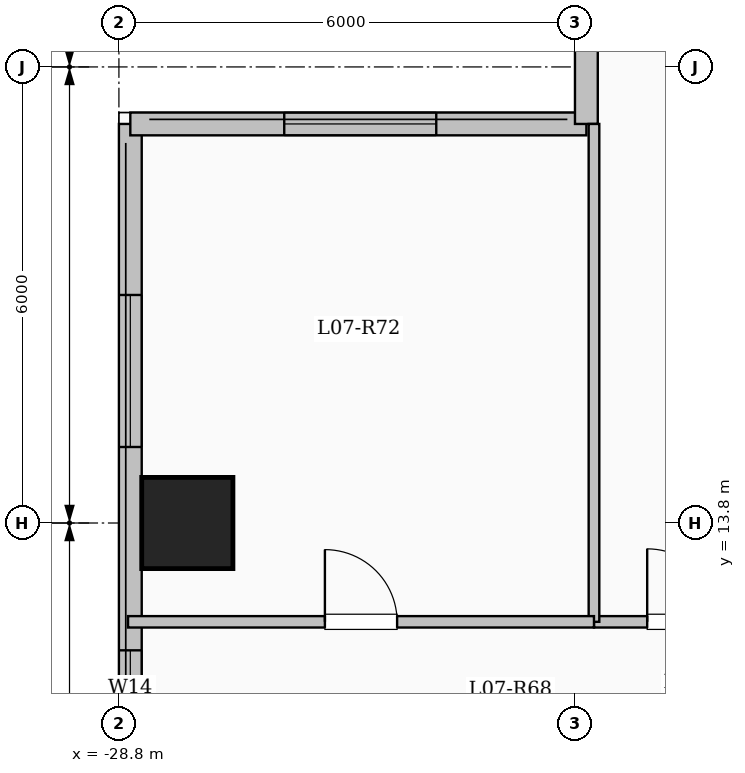
"""IFC4 building model, lengths in metres.
Left out: names, types, materials, properties, quantities, classifications, styles, units other than length and angle.
Written with IfcOpenShell. Run it as: python <this file> out.ifc"""

import sys

from ifc_helpers import new_model, si_unit, direction, frame, frame_2d, origin, origin_2d, place, context, subcontext, project, spatial, rectangle, extrude, element, fill, save


model = new_model("IFC4")
c1 = context("Model", 3, precision=1e-05, world=origin(), true_north=direction((0.0, 1.0)))
c2 = subcontext(c1, "Body", "Model", "MODEL_VIEW")
j1 = project(units=[si_unit("LENGTHUNIT", "METRE"), si_unit("PLANEANGLEUNIT", "RADIAN")], contexts=[c1])
p1 = place(None, origin())
s1 = spatial("IfcSite", under=j1, at=p1, CompositionType="ELEMENT")
p2 = place(p1, origin())
s2 = spatial("IfcBuilding", under=s1, at=p2, CompositionType="ELEMENT")
p3 = place(p2, frame((0.0, 0.0, 30.7)))
s3 = spatial("IfcBuildingStorey", under=s2, at=p3, CompositionType="ELEMENT", Elevation=30.7)
p4 = place(p3, frame((-27.9, 13.8, 0.0), z_axis=(0.0, 0.0, 1.0), x_axis=(1.0, 0.0, 0.0)))
e1 = element("IfcColumn", 1, at=p4, inside=s3, PredefinedType="COLUMN", context=c2, shape_type="SweptSolid", body=[
    extrude(rectangle(XDim=1.2, YDim=1.2, at=origin_2d()), origin(), (0.0, 0.0, 1.0), 3.35),
])
p5 = place(p3, frame((-28.65, -19.05, 0.0), z_axis=(0.0, 0.0, 1.0), x_axis=(0.0, 1.0, 0.0)))
e2 = element("IfcWall", 2, at=p5, inside=s3, PredefinedType="SOLIDWALL", context=c2, shape_type="SweptSolid", body=[
    extrude(rectangle(XDim=38.1, YDim=0.3, at=frame_2d((19.05, 0.0))), origin(), (0.0, 0.0, 1.0), 3.1),
])
p6 = place(p5, frame((3.15, 0.0, 0.9)))
e3 = element("IfcOpeningElement", 3, at=p6, cuts=e2, PredefinedType="OPENING", context=c2, shape_type="SweptSolid", body=[
    extrude(rectangle(XDim=2.4, YDim=1.8, at=frame_2d((1.2, 0.9))), frame((0.0, 0.16, 0.0), z_axis=(0.0, -1.0, 0.0), x_axis=(1.0, 0.0, 0.0)), (0.0, 0.0, 1.0), 0.32),
])
p7 = place(p5, frame((9.542, 0.0, 0.9)))
e4 = element("IfcOpeningElement", 4, at=p7, cuts=e2, PredefinedType="OPENING", context=c2, shape_type="SweptSolid", body=[
    extrude(rectangle(XDim=1.5, YDim=1.65, at=frame_2d((0.75, 0.825))), frame((0.0, 0.16, 0.0), z_axis=(0.0, -1.0, 0.0), x_axis=(1.0, 0.0, 0.0)), (0.0, 0.0, 1.0), 0.32),
])
p8 = place(p5, frame((19.8, 0.0, 0.9)))
e5 = element("IfcOpeningElement", 5, at=p8, cuts=e2, PredefinedType="OPENING", context=c2, shape_type="SweptSolid", body=[
    extrude(rectangle(XDim=2.0, YDim=1.7, at=frame_2d((1.0, 0.85))), frame((0.0, 0.16, 0.0), z_axis=(0.0, -1.0, 0.0), x_axis=(1.0, 0.0, 0.0)), (0.0, 0.0, 1.0), 0.32),
])
p9 = place(p5, frame((30.175, 0.0, 0.95)))
e6 = element("IfcOpeningElement", 6, at=p9, cuts=e2, PredefinedType="OPENING", context=c2, shape_type="SweptSolid", body=[
    extrude(rectangle(XDim=1.0, YDim=1.5, at=frame_2d((0.5, 0.75))), frame((0.0, 0.16, 0.0), z_axis=(0.0, -1.0, 0.0), x_axis=(1.0, 0.0, 0.0)), (0.0, 0.0, 1.0), 0.32),
])
p10 = place(p5, frame((33.85, 0.0, 0.9)))
e7 = element("IfcOpeningElement", 7, at=p10, cuts=e2, PredefinedType="OPENING", context=c2, shape_type="SweptSolid", body=[
    extrude(rectangle(XDim=2.0, YDim=1.7, at=frame_2d((1.0, 0.85))), frame((0.0, 0.16, 0.0), z_axis=(0.0, -1.0, 0.0), x_axis=(1.0, 0.0, 0.0)), (0.0, 0.0, 1.0), 0.32),
])
p11 = place(p3, frame((-28.65, 19.05, 0.0), z_axis=(0.0, 0.0, 1.0), x_axis=(1.0, 0.0, 0.0)))
e8 = element("IfcWall", 8, at=p11, inside=s3, PredefinedType="SOLIDWALL", context=c2, shape_type="SweptSolid", body=[
    extrude(rectangle(XDim=6.0, YDim=0.3, at=frame_2d((3.0, 0.0))), origin(), (0.0, 0.0, 1.0), 3.1),
])
p12 = place(p11, frame((2.025, 0.0, 0.9)))
e9 = element("IfcOpeningElement", 9, at=p12, cuts=e8, PredefinedType="OPENING", context=c2, shape_type="SweptSolid", body=[
    extrude(rectangle(XDim=2.0, YDim=1.7, at=frame_2d((1.0, 0.85))), frame((0.0, 0.16, 0.0), z_axis=(0.0, -1.0, 0.0), x_axis=(1.0, 0.0, 0.0)), (0.0, 0.0, 1.0), 0.32),
])
p13 = place(p3, frame((-22.65, 19.05, 0.0), z_axis=(0.0, 0.0, 1.0), x_axis=(0.0, 1.0, 0.0)))
e10 = element("IfcWall", 10, at=p13, inside=s3, PredefinedType="SOLIDWALL", context=c2, shape_type="SweptSolid", body=[
    extrude(rectangle(XDim=4.5, YDim=0.3, at=frame_2d((2.25, 0.0))), origin(), (0.0, 0.0, 1.0), 3.1),
])
p14 = place(p13, frame((1.032, 0.0, 0.9)))
e11 = element("IfcOpeningElement", 11, at=p14, cuts=e10, PredefinedType="OPENING", context=c2, shape_type="SweptSolid", body=[
    extrude(rectangle(XDim=2.4, YDim=1.8, at=frame_2d((1.2, 0.9))), frame((0.0, 0.16, 0.0), z_axis=(0.0, -1.0, 0.0), x_axis=(1.0, 0.0, 0.0)), (0.0, 0.0, 1.0), 0.32),
])
p15 = place(p3, frame((-22.55, 12.5, 0.0), z_axis=(0.0, 0.0, 1.0), x_axis=(1.0, 0.0, 0.0)))
e12 = element("IfcWall", 12, at=p15, inside=s3, PredefinedType="PARTITIONING", context=c2, shape_type="SweptSolid", body=[
    extrude(rectangle(XDim=18.7, YDim=0.15, at=frame_2d((9.35, 0.0))), origin(), (0.0, 0.0, 1.0), 3.1),
])
p16 = place(p15, frame((0.7, 0.0, 0.0)))
e13 = element("IfcOpeningElement", 13, at=p16, cuts=e12, PredefinedType="OPENING", context=c2, shape_type="SweptSolid", body=[
    extrude(rectangle(XDim=0.96, YDim=2.15, at=frame_2d((0.48, 1.075))), frame((0.0, 0.085, 0.0), z_axis=(0.0, -1.0, 0.0), x_axis=(1.0, 0.0, 0.0)), (0.0, 0.0, 1.0), 0.17),
])
p17 = place(p3, frame((-22.55, 12.5, 0.0), z_axis=(0.0, 0.0, 1.0), x_axis=(0.0, 1.0, 0.0)))
e14 = element("IfcWall", 14, at=p17, inside=s3, PredefinedType="PARTITIONING", context=c2, shape_type="SweptSolid", body=[
    extrude(rectangle(XDim=6.55, YDim=0.14, at=frame_2d((3.275, 0.0))), origin(), (0.0, 0.0, 1.0), 3.1),
])
p18 = place(p3, frame((-28.68, 12.5, 0.0), z_axis=(0.0, 0.0, 1.0), x_axis=(1.0, 0.0, 0.0)))
e15 = element("IfcWall", 15, at=p18, inside=s3, PredefinedType="PARTITIONING", context=c2, shape_type="SweptSolid", body=[
    extrude(rectangle(XDim=6.13, YDim=0.15, at=frame_2d((3.065, 0.0))), origin(), (0.0, 0.0, 1.0), 3.1),
])
p19 = place(p18, frame((2.59, 0.0, 0.0)))
e16 = element("IfcOpeningElement", 16, at=p19, cuts=e15, PredefinedType="OPENING", context=c2, shape_type="SweptSolid", body=[
    extrude(rectangle(XDim=0.95, YDim=2.15, at=frame_2d((0.475, 1.075))), frame((0.0, 0.085, 0.0), z_axis=(0.0, -1.0, 0.0), x_axis=(1.0, 0.0, 0.0)), (0.0, 0.0, 1.0), 0.17),
])
p20 = place(p9, origin())
e17 = element("IfcWindow", 17, at=p20, inside=s3, PartitioningType="SINGLE_PANEL", PredefinedType="WINDOW", context=c2, shape_type="SweptSolid", body=[
    extrude(rectangle(XDim=1.0, YDim=1.5, at=frame_2d((0.5, 0.75))), frame((0.0, 0.03, 0.0), z_axis=(0.0, -1.0, 0.0), x_axis=(1.0, 0.0, 0.0)), (0.0, 0.0, 1.0), 0.06),
])
fill(e6, e17)
p21 = place(p10, origin())
e18 = element("IfcWindow", 18, at=p21, inside=s3, PartitioningType="SINGLE_PANEL", PredefinedType="WINDOW", context=c2, shape_type="SweptSolid", body=[
    extrude(rectangle(XDim=2.0, YDim=1.7, at=frame_2d((1.0, 0.85))), frame((0.0, 0.03, 0.0), z_axis=(0.0, -1.0, 0.0), x_axis=(1.0, 0.0, 0.0)), (0.0, 0.0, 1.0), 0.06),
])
fill(e7, e18)
p22 = place(p12, origin())
e19 = element("IfcWindow", 19, at=p22, inside=s3, PartitioningType="SINGLE_PANEL", PredefinedType="WINDOW", context=c2, shape_type="SweptSolid", body=[
    extrude(rectangle(XDim=2.0, YDim=1.7, at=frame_2d((1.0, 0.85))), frame((0.0, 0.03, 0.0), z_axis=(0.0, -1.0, 0.0), x_axis=(1.0, 0.0, 0.0)), (0.0, 0.0, 1.0), 0.06),
])
fill(e9, e19)
p23 = place(p16, origin())
e20 = element("IfcDoor", 20, at=p23, inside=s3, OperationType="SINGLE_SWING_LEFT", PredefinedType="DOOR", context=c2, shape_type="SweptSolid", body=[
    extrude(rectangle(XDim=0.96, YDim=2.15, at=frame_2d((0.48, 1.075))), frame((0.0, 0.025, 0.0), z_axis=(0.0, -1.0, 0.0), x_axis=(1.0, 0.0, 0.0)), (0.0, 0.0, 1.0), 0.05),
])
fill(e13, e20)
p24 = place(p19, origin())
e21 = element("IfcDoor", 21, at=p24, inside=s3, OperationType="SINGLE_SWING_LEFT", PredefinedType="DOOR", context=c2, shape_type="SweptSolid", body=[
    extrude(rectangle(XDim=0.95, YDim=2.15, at=frame_2d((0.475, 1.075))), frame((0.0, 0.025, 0.0), z_axis=(0.0, -1.0, 0.0), x_axis=(1.0, 0.0, 0.0)), (0.0, 0.0, 1.0), 0.05),
])
fill(e16, e21)
save(model, sys.argv[1])
